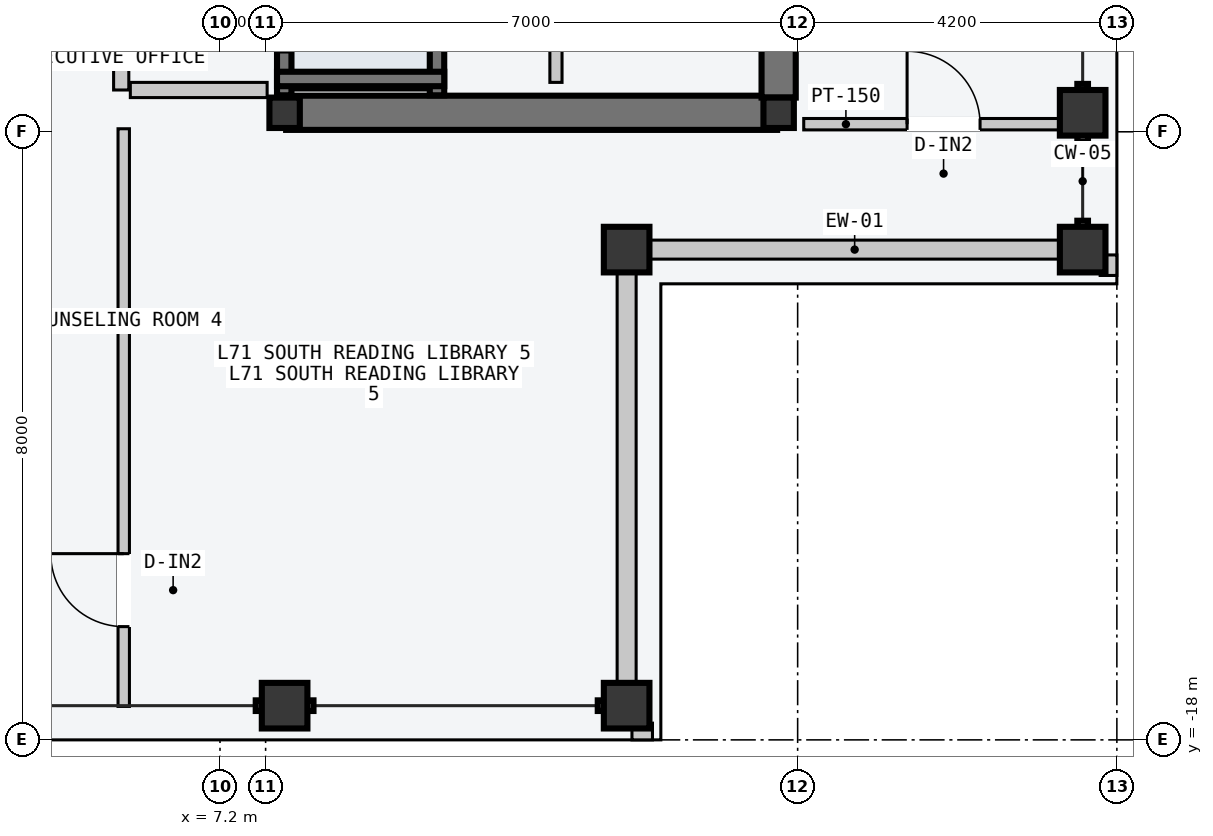
"""IFC4 building model, lengths in metres.
Left out: names, types, materials, properties, quantities, classifications, styles, units other than length and angle.
Written with IfcOpenShell. Run it as: python <this file> out.ifc"""

import sys

from ifc_helpers import new_model, si_unit, direction, frame, frame_2d, origin, origin_2d, place, context, subcontext, project, spatial, rectangle, hollow_rectangle, i_section, extrude, element, fill, save


model = new_model("IFC4")
c1 = context("Model", 3, precision=1e-05, world=origin(), true_north=direction((0.0, 1.0)))
c2 = subcontext(c1, "Body", "Model", "MODEL_VIEW")
j1 = project(units=[si_unit("LENGTHUNIT", "METRE"), si_unit("PLANEANGLEUNIT", "RADIAN")], contexts=[c1])
p1 = place(None, origin())
s1 = spatial("IfcSite", under=j1, at=p1, CompositionType="ELEMENT")
p2 = place(p1, origin())
s2 = spatial("IfcBuilding", under=s1, at=p2, CompositionType="ELEMENT")
p3 = place(p2, frame((0.0, 0.0, 268.8)))
s3 = spatial("IfcBuildingStorey", under=s2, at=p3, CompositionType="ELEMENT", Elevation=268.8)
p4 = place(p3, frame((8.07, -9.75, -0.2), z_axis=(0.0, 0.0, 1.0), x_axis=(1.0, 0.0, 0.0)))
e1 = element("IfcWall", 1, at=p4, inside=s3, PredefinedType="SHEAR", context=c2, shape_type="SweptSolid", body=[
    extrude(rectangle(XDim=6.46, YDim=0.45, at=frame_2d((3.23, 0.0))), origin(), (0.0, 0.0, 1.0), 3.6),
])
p5 = place(p3, frame((14.55, -9.55, -0.2), z_axis=(0.0, 0.0, 1.0), x_axis=(0.0, 1.0, 0.0)))
e2 = element("IfcWall", 2, at=p5, inside=s3, PredefinedType="SHEAR", context=c2, shape_type="SweptSolid", body=[
    extrude(rectangle(XDim=9.35, YDim=0.45, at=frame_2d((4.675, 0.0))), origin(), (0.0, 0.0, 1.0), 3.6),
])
for number, where, z_axis, x_axis in (
    (3, (8.05, -9.75, 0.0), (0.0, 0.0, 1.0), (1.0, 0.0, 0.0)),
    (4, (14.55, -9.75, 0.0), (0.0, 0.0, 1.0), (1.0, 0.0, 0.0)),
):
    element("IfcColumn", number, at=place(p3, frame(where, z_axis=z_axis, x_axis=x_axis)), inside=s3, PredefinedType="COLUMN", context=c2, shape_type="SweptSolid", body=[
        extrude(i_section(OverallWidth=0.4, OverallDepth=0.4, WebThickness=0.013, FlangeThickness=0.021, at=origin_2d()), origin(), (0.0, 0.0, 1.0), 3.6),
    ])
for number, where, z_axis, x_axis in (
    (5, (8.05, -17.55, 0.0), (0.0, 0.0, 1.0), (1.0, 0.0, 0.0)),
    (6, (12.55, -17.55, 0.0), (0.0, 0.0, 1.0), (1.0, 0.0, 0.0)),
    (7, (18.55, -11.55, 0.0), (0.0, 0.0, 1.0), (0.0, 1.0, 0.0)),
    (8, (18.55, -9.75, 0.0), (0.0, 0.0, 1.0), (0.0, 1.0, 0.0)),
    (9, (12.55, -11.55, 0.0), (0.0, 0.0, 1.0), (1.0, 0.0, 0.0)),
):
    element("IfcColumn", number, at=place(p3, frame(where, z_axis=z_axis, x_axis=x_axis)), inside=s3, PredefinedType="COLUMN", context=c2, shape_type="SweptSolid", body=[
        extrude(hollow_rectangle(XDim=0.6, YDim=0.6, WallThickness=0.025, at=origin_2d()), origin(), (0.0, 0.0, 1.0), 3.6),
    ])
for number, where, z_axis, x_axis in (
    (10, (12.86, -11.55, 0.0), (0.0, 0.0, 1.0), (1.0, 0.0, 0.0)),
    (11, (12.55, -17.24, 0.0), (0.0, 0.0, 1.0), (0.0, 1.0, 0.0)),
):
    element("IfcWall", number, at=place(p3, frame(where, z_axis=z_axis, x_axis=x_axis)), inside=s3, PredefinedType="STANDARD", context=c2, shape_type="SweptSolid", body=[
        extrude(rectangle(XDim=5.38, YDim=0.25, at=frame_2d((2.69, 0.0))), origin(), (0.0, 0.0, 1.0), 2.85),
    ])
for number, where, z_axis, x_axis in (
    (12, (12.62, -17.89, 0.0), (0.0, 0.0, 1.0), (1.0, 0.0, 0.0)),
    (13, (18.89, -11.89, 0.0), (0.0, 0.0, 1.0), (0.0, 1.0, 0.0)),
):
    element("IfcWall", number, at=place(p3, frame(where, z_axis=z_axis, x_axis=x_axis)), inside=s3, PredefinedType="PARAPET", context=c2, shape_type="SweptSolid", body=[
        extrude(rectangle(XDim=0.27, YDim=0.22, at=frame_2d((0.135, 0.0))), origin(), (0.0, 0.0, 1.0), 1.2),
    ])
p6 = place(p3, frame((8.045, -9.52, -0.2), z_axis=(0.0, 0.0, 1.0), x_axis=(0.0, 1.0, 0.0)))
e14 = element("IfcWall", 14, at=p6, inside=s3, PredefinedType="SOLIDWALL", context=c2, shape_type="SweptSolid", body=[
    extrude(rectangle(XDim=2.12, YDim=0.19, at=frame_2d((1.06, 0.0))), origin(), (0.0, 0.0, 1.0), 3.6),
])
p7 = place(p6, frame((0.57, 0.0, 0.2)))
e15 = element("IfcOpeningElement", 15, at=p7, cuts=e14, PredefinedType="OPENING", context=c2, shape_type="SweptSolid", body=[
    extrude(rectangle(XDim=1.1, YDim=2.2, at=frame_2d((0.55, 1.1))), frame((0.0, 0.105, 0.0), z_axis=(0.0, -1.0, 0.0), x_axis=(1.0, 0.0, 0.0)), (0.0, 0.0, 1.0), 0.21),
])
p8 = place(p3, frame((10.055, -9.52, -0.2), z_axis=(0.0, 0.0, 1.0), x_axis=(0.0, 1.0, 0.0)))
e16 = element("IfcWall", 16, at=p8, inside=s3, PredefinedType="SOLIDWALL", context=c2, shape_type="SweptSolid", body=[
    extrude(rectangle(XDim=2.12, YDim=0.19, at=frame_2d((1.06, 0.0))), origin(), (0.0, 0.0, 1.0), 3.6),
])
p9 = place(p3, frame((7.95, -9.305, -0.2), z_axis=(0.0, 0.0, 1.0), x_axis=(1.0, 0.0, 0.0)))
e17 = element("IfcWall", 17, at=p9, inside=s3, PredefinedType="SOLIDWALL", context=c2, shape_type="SweptSolid", body=[
    extrude(rectangle(XDim=2.2, YDim=0.19, at=frame_2d((1.1, 0.0))), origin(), (0.0, 0.0, 1.0), 3.6),
])
p10 = place(p3, frame((5.9, -9.45, 0.0), z_axis=(0.0, 0.0, 1.0), x_axis=(0.0, 1.0, 0.0)))
e18 = element("IfcWall", 18, at=p10, inside=s3, PredefinedType="PARTITIONING", context=c2, shape_type="SweptSolid", body=[
    extrude(rectangle(XDim=10.5, YDim=0.2, at=frame_2d((5.25, 0.0))), origin(), (0.0, 0.0, 1.0), 3.4),
])
p11 = place(p10, frame((3.9, 0.0, 0.0)))
e19 = element("IfcOpeningElement", 19, at=p11, cuts=e18, PredefinedType="OPENING", context=c2, shape_type="SweptSolid", body=[
    extrude(rectangle(XDim=1.5, YDim=2.2, at=frame_2d((0.75, 1.1))), frame((0.0, 0.11, 0.0), z_axis=(0.0, -1.0, 0.0), x_axis=(1.0, 0.0, 0.0)), (0.0, 0.0, 1.0), 0.22),
])
p12 = place(p3, frame((6.02, -9.45, 0.0), z_axis=(0.0, 0.0, 1.0), x_axis=(1.0, 0.0, 0.0)))
e20 = element("IfcWall", 20, at=p12, inside=s3, PredefinedType="PARTITIONING", context=c2, shape_type="SweptSolid", body=[
    extrude(rectangle(XDim=1.8, YDim=0.2, at=frame_2d((0.9, 0.0))), origin(), (0.0, 0.0, 1.0), 3.4),
])
p13 = place(p3, frame((11.62, -9.35, 0.0), z_axis=(0.0, 0.0, 1.0), x_axis=(0.0, 1.0, 0.0)))
e21 = element("IfcWall", 21, at=p13, inside=s3, PredefinedType="PARTITIONING", context=c2, shape_type="SweptSolid", body=[
    extrude(rectangle(XDim=3.85, YDim=0.16, at=frame_2d((1.925, 0.0))), origin(), (0.0, 0.0, 1.0), 3.4),
])
p14 = place(p13, frame((1.475, 0.0, 0.0)))
e22 = element("IfcOpeningElement", 22, at=p14, cuts=e21, PredefinedType="OPENING", context=c2, shape_type="SweptSolid", body=[
    extrude(rectangle(XDim=0.9, YDim=2.15, at=frame_2d((0.45, 1.075))), frame((0.0, 0.09, 0.0), z_axis=(0.0, -1.0, 0.0), x_axis=(1.0, 0.0, 0.0)), (0.0, 0.0, 1.0), 0.18),
])
p15 = place(p3, frame((5.933, -17.56, 0.0), z_axis=(0.0, 0.0, 1.0), x_axis=(0.0, 1.0, 0.0)))
e23 = element("IfcWall", 23, at=p15, inside=s3, PredefinedType="PARTITIONING", context=c2, shape_type="SweptSolid", body=[
    extrude(rectangle(XDim=7.6, YDim=0.15, at=frame_2d((3.8, 0.0))), origin(), (0.0, 0.0, 1.0), 3.4),
])
p16 = place(p15, frame((1.05, 0.0, 0.0)))
e24 = element("IfcOpeningElement", 24, at=p16, cuts=e23, PredefinedType="OPENING", context=c2, shape_type="SweptSolid", body=[
    extrude(rectangle(XDim=0.96, YDim=2.18, at=frame_2d((0.48, 1.09))), frame((0.0, 0.085, 0.0), z_axis=(0.0, -1.0, 0.0), x_axis=(1.0, 0.0, 0.0)), (0.0, 0.0, 1.0), 0.17),
])
p17 = place(p3, frame((14.88, -9.9, 0.0), z_axis=(0.0, 0.0, 1.0), x_axis=(1.0, 0.0, 0.0)))
e25 = element("IfcWall", 25, at=p17, inside=s3, PredefinedType="PARTITIONING", context=c2, shape_type="SweptSolid", body=[
    extrude(rectangle(XDim=3.68, YDim=0.15, at=frame_2d((1.84, 0.0))), origin(), (0.0, 0.0, 1.0), 3.4),
])
p18 = place(p17, frame((1.36, 0.0, 0.0)))
e26 = element("IfcOpeningElement", 26, at=p18, cuts=e25, PredefinedType="OPENING", context=c2, shape_type="SweptSolid", body=[
    extrude(rectangle(XDim=0.96, YDim=2.18, at=frame_2d((0.48, 1.09))), frame((0.0, 0.085, 0.0), z_axis=(0.0, -1.0, 0.0), x_axis=(1.0, 0.0, 0.0)), (0.0, 0.0, 1.0), 0.17),
])
p19 = place(p16, origin())
e27 = element("IfcDoor", 27, at=p19, inside=s3, OperationType="SINGLE_SWING_RIGHT", PredefinedType="DOOR", context=c2, shape_type="SweptSolid", body=[
    extrude(rectangle(XDim=0.96, YDim=2.18, at=frame_2d((0.48, 1.09))), frame((0.0, 0.025, 0.0), z_axis=(0.0, -1.0, 0.0), x_axis=(1.0, 0.0, 0.0)), (0.0, 0.0, 1.0), 0.05),
])
fill(e24, e27)
p20 = place(p18, origin())
e28 = element("IfcDoor", 28, at=p20, inside=s3, OperationType="SINGLE_SWING_LEFT", PredefinedType="DOOR", context=c2, shape_type="SweptSolid", body=[
    extrude(rectangle(XDim=0.96, YDim=2.18, at=frame_2d((0.48, 1.09))), frame((0.0, 0.025, 0.0), z_axis=(0.0, -1.0, 0.0), x_axis=(1.0, 0.0, 0.0)), (0.0, 0.0, 1.0), 0.05),
])
fill(e26, e28)
save(model, sys.argv[1])
